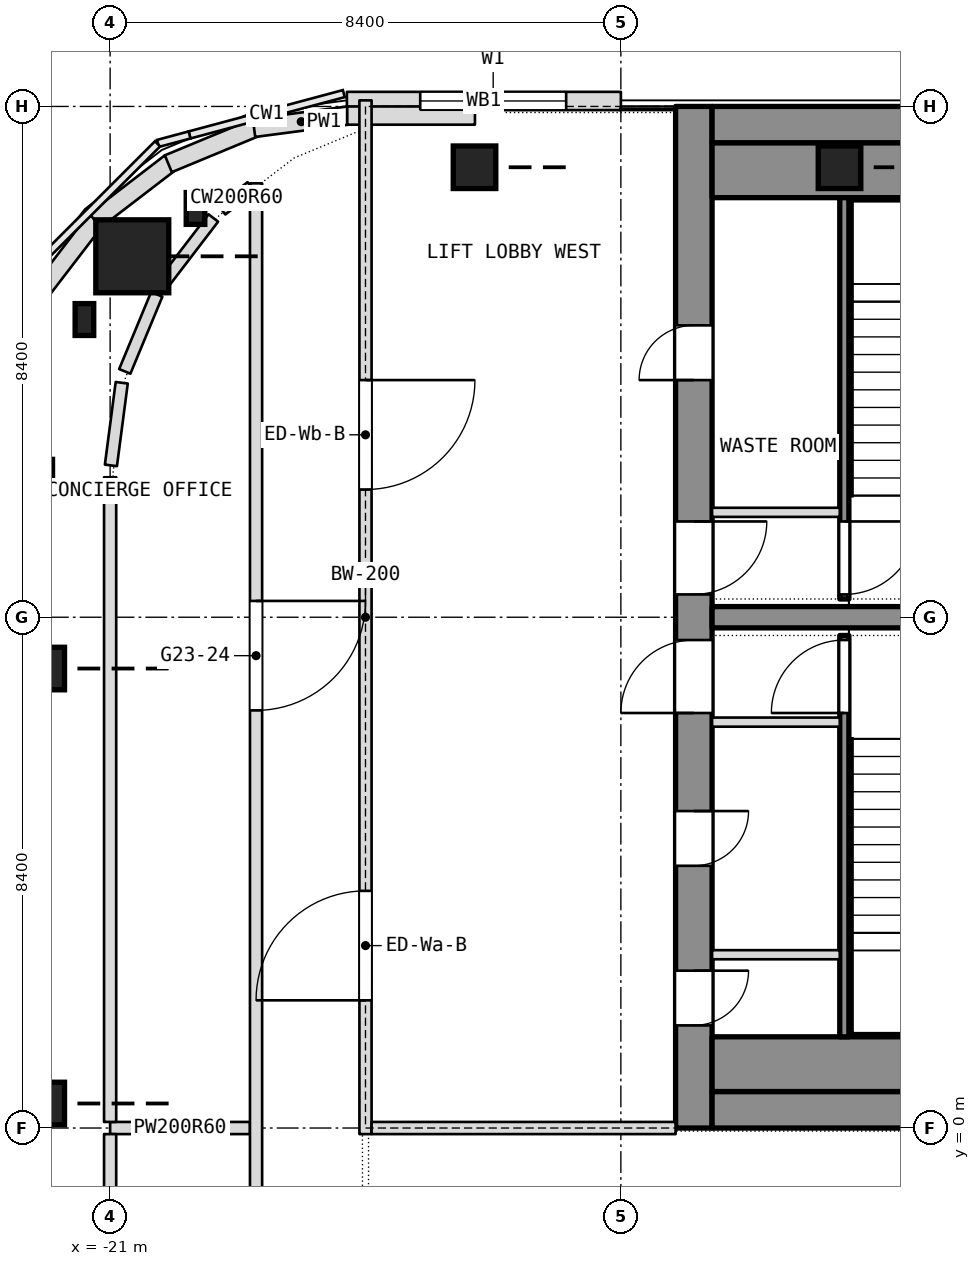
"""IFC4 building model, lengths in metres.
Left out: names, types, materials, properties, quantities, classifications, styles, units other than length and angle.
Written with IfcOpenShell. Run it as: python <this file> out.ifc"""

import sys

from ifc_helpers import new_model, si_unit, direction, frame, frame_2d, origin, origin_2d, place, context, subcontext, project, spatial, rectangle, i_section, extrude, element, fill, save


model = new_model("IFC4")
c1 = context("Model", 3, precision=1e-05, world=origin(), true_north=direction((0.0, 1.0)))
c2 = subcontext(c1, "Body", "Model", "MODEL_VIEW")
j1 = project(units=[si_unit("LENGTHUNIT", "METRE"), si_unit("PLANEANGLEUNIT", "RADIAN")], contexts=[c1])
p1 = place(None, origin())
s1 = spatial("IfcSite", under=j1, at=p1, CompositionType="ELEMENT")
p2 = place(p1, origin())
s2 = spatial("IfcBuilding", under=s1, at=p2, CompositionType="ELEMENT")
p3 = place(p2, frame((0.0, 0.0, 277.7)))
s3 = spatial("IfcBuildingStorey", under=s2, at=p3, CompositionType="ELEMENT", Elevation=277.7)
p4 = place(p3, frame((-11.4, 0.0, 0.0), z_axis=(0.0, 0.0, 1.0), x_axis=(0.0, 1.0, 0.0)))
e1 = element("IfcWall", 1, at=p4, inside=s3, PredefinedType="SHEAR", context=c2, shape_type="SweptSolid", body=[
    extrude(rectangle(XDim=16.8, YDim=0.6, at=frame_2d((8.4, 0.0))), origin(), (0.0, 0.0, 1.0), 3.6),
])
p5 = place(p4, frame((1.688, 0.0, 0.0)))
e2 = element("IfcOpeningElement", 2, at=p5, cuts=e1, PredefinedType="OPENING", context=c2, shape_type="SweptSolid", body=[
    extrude(rectangle(XDim=0.9, YDim=2.1, at=frame_2d((0.45, 1.05))), frame((0.0, 0.3, 0.0), z_axis=(0.0, -1.0, 0.0), x_axis=(1.0, 0.0, 0.0)), (0.0, 0.0, 1.0), 0.6),
])
p6 = place(p4, frame((4.312, 0.0, 0.0)))
e3 = element("IfcOpeningElement", 3, at=p6, cuts=e1, PredefinedType="OPENING", context=c2, shape_type="SweptSolid", body=[
    extrude(rectangle(XDim=0.9, YDim=2.1, at=frame_2d((0.45, 1.05))), frame((0.0, 0.3, 0.0), z_axis=(0.0, -1.0, 0.0), x_axis=(1.0, 0.0, 0.0)), (0.0, 0.0, 1.0), 0.6),
])
p7 = place(p4, frame((6.825, 0.0, 0.0)))
e4 = element("IfcOpeningElement", 4, at=p7, cuts=e1, PredefinedType="OPENING", context=c2, shape_type="SweptSolid", body=[
    extrude(rectangle(XDim=1.2, YDim=2.1, at=frame_2d((0.6, 1.05))), frame((0.0, 0.3, 0.0), z_axis=(0.0, -1.0, 0.0), x_axis=(1.0, 0.0, 0.0)), (0.0, 0.0, 1.0), 0.6),
])
p8 = place(p4, frame((12.3, 0.0, 0.0)))
e5 = element("IfcOpeningElement", 5, at=p8, cuts=e1, PredefinedType="OPENING", context=c2, shape_type="SweptSolid", body=[
    extrude(rectangle(XDim=0.9, YDim=2.1, at=frame_2d((0.45, 1.05))), frame((0.0, 0.3, 0.0), z_axis=(0.0, -1.0, 0.0), x_axis=(1.0, 0.0, 0.0)), (0.0, 0.0, 1.0), 0.6),
])
p9 = place(p4, frame((8.775, 0.0, 0.0)))
e6 = element("IfcOpeningElement", 6, at=p9, cuts=e1, PredefinedType="OPENING", context=c2, shape_type="SweptSolid", body=[
    extrude(rectangle(XDim=1.2, YDim=2.1, at=frame_2d((0.6, 1.05))), frame((0.0, 0.3, 0.0), z_axis=(0.0, -1.0, 0.0), x_axis=(1.0, 0.0, 0.0)), (0.0, 0.0, 1.0), 0.6),
])
for number, where, z_axis, x_axis in (
    (7, (-11.1, 0.3, 0.0), (0.0, 0.0, 1.0), (1.0, 0.0, 0.0)),
    (8, (-11.1, 16.5, 0.0), (0.0, 0.0, 1.0), (1.0, 0.0, 0.0)),
):
    element("IfcWall", number, at=place(p3, frame(where, z_axis=z_axis, x_axis=x_axis)), inside=s3, PredefinedType="SHEAR", context=c2, shape_type="SweptSolid", body=[
        extrude(rectangle(XDim=22.2, YDim=0.6, at=frame_2d((11.1, 0.0))), origin(), (0.0, 0.0, 1.0), 3.6),
    ])
p10 = place(p3, frame((-11.1, 8.4, 0.0), z_axis=(0.0, 0.0, 1.0), x_axis=(1.0, 0.0, 0.0)))
e9 = element("IfcWall", 9, at=p10, inside=s3, PredefinedType="SHEAR", context=c2, shape_type="SweptSolid", body=[
    extrude(rectangle(XDim=6.725, YDim=0.35, at=frame_2d((3.363, 0.0))), origin(), (0.0, 0.0, 1.0), 3.6),
])
for number, where, z_axis, x_axis in (
    (10, (-22.1, 0.403, 0.0), (0.0, 0.0, 1.0), (1.0, 0.0, 0.0)),
    (11, (-22.1, 7.556, 0.0), (0.0, 0.0, 1.0), (1.0, 0.0, 0.0)),
):
    element("IfcColumn", number, at=place(p3, frame(where, z_axis=z_axis, x_axis=x_axis)), inside=s3, PredefinedType="COLUMN", context=c2, shape_type="SweptSolid", body=[
        extrude(i_section(OverallWidth=0.306, OverallDepth=0.524, WebThickness=0.024, FlangeThickness=0.04, FilletRadius=0.027, at=origin_2d()), origin(), (0.0, 0.0, 1.0), 2.94),
    ])
for number, where, z_axis, x_axis in (
    (12, (-22.1, 10.734, -0.26), (0.0, 0.0, 1.0), (1.0, 0.0, 0.0)),
    (13, (-21.423, 13.296, -0.26), (0.0, 0.0, 1.0), (1.0, 0.0, 0.0)),
):
    element("IfcColumn", number, at=place(p3, frame(where, z_axis=z_axis, x_axis=x_axis)), inside=s3, PredefinedType="COLUMN", context=c2, shape_type="SweptSolid", body=[
        extrude(i_section(OverallWidth=0.306, OverallDepth=0.524, WebThickness=0.024, FlangeThickness=0.04, FilletRadius=0.027, at=origin_2d()), origin(), (0.0, 0.0, 1.0), 3.2),
    ])
p11 = place(p3, frame((-20.635, 14.335, 0.0), z_axis=(0.0, 0.0, 1.0), x_axis=(1.0, 0.0, 0.0)))
e14 = element("IfcColumn", 14, at=p11, inside=s3, PredefinedType="COLUMN", context=c2, shape_type="SweptSolid", body=[
    extrude(i_section(OverallWidth=0.306, OverallDepth=0.524, WebThickness=0.024, FlangeThickness=0.04, FilletRadius=0.027, at=origin_2d()), origin(), (0.0, 0.0, 1.0), 2.94),
])
p12 = place(p3, frame((-19.596, 15.123, -0.26), z_axis=(0.0, 0.0, 1.0), x_axis=(1.0, 0.0, 0.0)))
e15 = element("IfcColumn", 15, at=p12, inside=s3, PredefinedType="COLUMN", context=c2, shape_type="SweptSolid", body=[
    extrude(i_section(OverallWidth=0.306, OverallDepth=0.524, WebThickness=0.024, FlangeThickness=0.04, FilletRadius=0.027, at=origin_2d()), origin(), (0.0, 0.0, 1.0), 3.2),
])
p13 = place(p3, frame((-21.0, 0.0, 0.0), z_axis=(0.0, 0.0, 1.0), x_axis=(1.0, 0.0, 0.0)))
e16 = element("IfcWall", 16, at=p13, inside=s3, PredefinedType="PARTITIONING", context=c2, shape_type="SweptSolid", body=[
    extrude(rectangle(XDim=2.3, YDim=0.2, at=frame_2d((1.15, 0.0))), origin(), (0.0, 0.0, 1.0), 2.94),
])
p14 = place(p3, frame((-18.6, -11.8, 0.0), z_axis=(0.0, 0.0, 1.0), x_axis=(0.0, 1.0, 0.0)))
e17 = element("IfcWall", 17, at=p14, inside=s3, PredefinedType="PARTITIONING", context=c2, shape_type="SweptSolid", body=[
    extrude(rectangle(XDim=27.336, YDim=0.2, at=frame_2d((13.668, 0.0))), origin(), (0.0, 0.0, 1.0), 3.34),
])
p15 = place(p14, frame((18.668, 0.0, 0.0)))
e18 = element("IfcOpeningElement", 18, at=p15, cuts=e17, PredefinedType="OPENING", context=c2, shape_type="SweptSolid", body=[
    extrude(rectangle(XDim=1.8, YDim=2.1, at=frame_2d((0.9, 1.05))), frame((0.0, 0.1, 0.0), z_axis=(0.0, -1.0, 0.0), x_axis=(1.0, 0.0, 0.0)), (0.0, 0.0, 1.0), 0.2),
])
p16 = place(p14, frame((5.45, 0.0, 0.0)))
e19 = element("IfcOpeningElement", 19, at=p16, cuts=e17, PredefinedType="OPENING", context=c2, shape_type="SweptSolid", body=[
    extrude(rectangle(XDim=1.0, YDim=2.1, at=frame_2d((0.5, 1.05))), frame((0.0, 0.1, 0.0), z_axis=(0.0, -1.0, 0.0), x_axis=(1.0, 0.0, 0.0)), (0.0, 0.0, 1.0), 0.2),
])
p17 = place(p3, frame((-21.0, -11.6, 0.0), z_axis=(0.0, 0.0, 1.0), x_axis=(0.0, 1.0, 0.0)))
e20 = element("IfcWall", 20, at=p17, inside=s3, PredefinedType="PARTITIONING", context=c2, shape_type="SweptSolid", body=[
    extrude(rectangle(XDim=11.5, YDim=0.2, at=frame_2d((5.75, 0.0))), origin(), (0.0, 0.0, 1.0), 3.34),
])
p18 = place(p3, frame((-21.0, 0.1, 0.0), z_axis=(0.0, 0.0, 1.0), x_axis=(0.0, 1.0, 0.0)))
e21 = element("IfcWall", 21, at=p18, inside=s3, PredefinedType="PARTITIONING", context=c2, shape_type="SweptSolid", body=[
    extrude(rectangle(XDim=10.602, YDim=0.2, at=frame_2d((5.301, 0.0))), origin(), (0.0, 0.0, 1.0), 3.34),
])
p19 = place(p3, frame((-20.987, 10.897, 0.0), z_axis=(0.0, 0.0, 1.0), x_axis=(0.129841713905, 0.991534734303, 0.0)))
e22 = element("IfcWall", 22, at=p19, inside=s3, PredefinedType="PARTITIONING", context=c2, shape_type="SweptSolid", body=[
    extrude(rectangle(XDim=1.371, YDim=0.2, at=frame_2d((0.686, 0.0))), origin(), (0.0, 0.0, 1.0), 3.34),
])
p20 = place(p3, frame((-19.166, 15.103, 0.0), z_axis=(0.0, 0.0, 1.0), x_axis=(0.794663000987, 0.607050833837, 0.0)))
e23 = element("IfcWall", 23, at=p20, inside=s3, PredefinedType="PARTITIONING", context=c2, shape_type="SweptSolid", body=[
    extrude(rectangle(XDim=0.613, YDim=0.2, at=frame_2d((0.306, 0.0))), origin(), (0.0, 0.0, 1.0), 3.34),
])
p21 = place(p3, frame((-20.759, 12.443, 0.0), z_axis=(0.0, 0.0, 1.0), x_axis=(0.383540942064, 0.923523873953, 0.0)))
e24 = element("IfcWall", 24, at=p21, inside=s3, PredefinedType="PARTITIONING", context=c2, shape_type="SweptSolid", body=[
    extrude(rectangle(XDim=1.372, YDim=0.2, at=frame_2d((0.686, 0.0))), origin(), (0.0, 0.0, 1.0), 3.34),
])
p22 = place(p3, frame((-20.136, 13.877, 0.0), z_axis=(0.0, 0.0, 1.0), x_axis=(0.607522804237, 0.794302236137, 0.0)))
e25 = element("IfcWall", 25, at=p22, inside=s3, PredefinedType="PARTITIONING", context=c2, shape_type="SweptSolid", body=[
    extrude(rectangle(XDim=1.371, YDim=0.2, at=frame_2d((0.686, 0.0))), origin(), (0.0, 0.0, 1.0), 3.34),
])
p23 = place(p3, frame((-12.6, 16.89, 0.0), z_axis=(0.0, 0.0, 1.0), x_axis=(-1.0, 0.0, 0.0)))
e26 = element("IfcWall", 26, at=p23, inside=s3, PredefinedType="NOTDEFINED", context=c2, shape_type="SweptSolid", body=[
    extrude(rectangle(XDim=4.506, YDim=0.3, at=frame_2d((2.253, 0.0))), origin(), (0.0, 0.0, 1.0), 3.6),
])
p24 = place(p23, frame((0.9, 0.0, 0.9)))
e27 = element("IfcOpeningElement", 27, at=p24, cuts=e26, PredefinedType="OPENING", context=c2, shape_type="SweptSolid", body=[
    extrude(rectangle(XDim=2.4, YDim=2.1, at=frame_2d((1.2, 1.05))), frame((0.0, 0.15, 0.0), z_axis=(0.0, -1.0, 0.0), x_axis=(1.0, 0.0, 0.0)), (0.0, 0.0, 1.0), 0.3),
])
p25 = place(p3, frame((-22.177, 13.709, 3.6), z_axis=(0.0, 0.0, 1.0), x_axis=(0.608791411033, 0.793330333374, 0.0)))
e28 = element("IfcWall", 28, at=p25, inside=s3, PredefinedType="PARAPET", context=c2, shape_type="SweptSolid", body=[
    extrude(rectangle(XDim=1.566, YDim=0.3, at=frame_2d((0.783, 0.0))), origin(), (0.0, 0.0, 1.0), 1.1),
])
for number, where, z_axis, x_axis in (
    (29, (-21.251, 14.924, 3.6), (0.0, 0.0, 1.0), (0.793, 0.609, 0.0)),
    (30, (-20.042, 15.858, 3.6), (0.0, 0.0, 1.0), (0.924, 0.383, 0.0)),
):
    element("IfcWall", number, at=place(p3, frame(where, z_axis=z_axis, x_axis=x_axis)), inside=s3, PredefinedType="PARAPET", context=c2, shape_type="SweptSolid", body=[
        extrude(rectangle(XDim=1.566, YDim=0.3, at=frame_2d((0.783, 0.0))), origin(), (0.0, 0.0, 1.0), 1.1),
    ])
p26 = place(p3, frame((-18.633, 16.447, 3.6), z_axis=(0.0, 0.0, 1.0), x_axis=(0.991453765022, 0.130458544462, 0.0)))
e31 = element("IfcWall", 31, at=p26, inside=s3, PredefinedType="PARAPET", context=c2, shape_type="SweptSolid", body=[
    extrude(rectangle(XDim=1.566, YDim=0.3, at=frame_2d((0.783, 0.0))), origin(), (0.0, 0.0, 1.0), 1.1),
])
p27 = place(p3, frame((-17.1, 16.65, 3.6), z_axis=(0.0, 0.0, 1.0), x_axis=(1.0, 0.0, 0.0)))
e32 = element("IfcWall", 32, at=p27, inside=s3, PredefinedType="PARAPET", context=c2, shape_type="SweptSolid", body=[
    extrude(rectangle(XDim=2.1, YDim=0.3, at=frame_2d((1.05, 0.0))), origin(), (0.0, 0.0, 1.0), 1.1),
])
for number, where, z_axis, x_axis in (
    (33, (-11.1, 1.05, 0.0), (0.0, 0.0, 1.0), (1.0, 0.0, 0.0)),
    (34, (-11.1, 15.75, 0.0), (0.0, 0.0, 1.0), (1.0, 0.0, 0.0)),
):
    element("IfcWall", number, at=place(p3, frame(where, z_axis=z_axis, x_axis=x_axis)), inside=s3, PredefinedType="PARTITIONING", context=c2, shape_type="SweptSolid", body=[
        extrude(rectangle(XDim=22.2, YDim=0.9, at=frame_2d((11.1, 0.0))), origin(), (0.0, 0.0, 1.0), 3.34),
    ])
p28 = place(p3, frame((-8.925, 1.5, 0.0), z_axis=(0.0, 0.0, 1.0), x_axis=(0.0, 1.0, 0.0)))
e35 = element("IfcWall", 35, at=p28, inside=s3, PredefinedType="SHEAR", context=c2, shape_type="SweptSolid", body=[
    extrude(rectangle(XDim=6.6, YDim=0.15, at=frame_2d((3.3, 0.0))), origin(), (0.0, 0.0, 1.0), 3.34),
])
p29 = place(p28, frame((5.325, 0.0, 0.0)))
e36 = element("IfcOpeningElement", 36, at=p29, cuts=e35, PredefinedType="OPENING", context=c2, shape_type="SweptSolid", body=[
    extrude(rectangle(XDim=1.2, YDim=2.1, at=frame_2d((0.6, 1.05))), frame((0.0, 0.075, 0.0), z_axis=(0.0, -1.0, 0.0), x_axis=(1.0, 0.0, 0.0)), (0.0, 0.0, 1.0), 0.15),
])
for number, where, z_axis, x_axis in (
    (37, (-11.1, 6.675, 0.0), (0.0, 0.0, 1.0), (1.0, 0.0, 0.0)),
    (38, (-11.1, 2.85, 0.0), (0.0, 0.0, 1.0), (1.0, 0.0, 0.0)),
):
    element("IfcWall", number, at=place(p3, frame(where, z_axis=z_axis, x_axis=x_axis)), inside=s3, PredefinedType="PARTITIONING", context=c2, shape_type="SweptSolid", body=[
        extrude(rectangle(XDim=2.1, YDim=0.15, at=frame_2d((1.05, 0.0))), origin(), (0.0, 0.0, 1.0), 3.34),
    ])
p30 = place(p3, frame((-8.925, 8.7, 0.0), z_axis=(0.0, 0.0, 1.0), x_axis=(0.0, 1.0, 0.0)))
e39 = element("IfcWall", 39, at=p30, inside=s3, PredefinedType="SHEAR", context=c2, shape_type="SweptSolid", body=[
    extrude(rectangle(XDim=6.6, YDim=0.15, at=frame_2d((3.3, 0.0))), origin(), (0.0, 0.0, 1.0), 3.34),
])
p31 = place(p30, frame((0.075, 0.0, 0.0)))
e40 = element("IfcOpeningElement", 40, at=p31, cuts=e39, PredefinedType="OPENING", context=c2, shape_type="SweptSolid", body=[
    extrude(rectangle(XDim=1.2, YDim=2.1, at=frame_2d((0.6, 1.05))), frame((0.0, 0.075, 0.0), z_axis=(0.0, -1.0, 0.0), x_axis=(1.0, 0.0, 0.0)), (0.0, 0.0, 1.0), 0.15),
])
p32 = place(p3, frame((-11.1, 10.125, 0.0), z_axis=(0.0, 0.0, 1.0), x_axis=(1.0, 0.0, 0.0)))
e41 = element("IfcWall", 41, at=p32, inside=s3, PredefinedType="PARTITIONING", context=c2, shape_type="SweptSolid", body=[
    extrude(rectangle(XDim=2.1, YDim=0.15, at=frame_2d((1.05, 0.0))), origin(), (0.0, 0.0, 1.0), 3.34),
])
p33 = place(p3, frame((-16.8, -0.1, 0.0), z_axis=(0.0, 0.0, 1.0), x_axis=(0.0, 1.0, 0.0)))
e42 = element("IfcWall", 42, at=p33, inside=s3, PredefinedType="PARTITIONING", context=c2, shape_type="SweptSolid", body=[
    extrude(rectangle(XDim=17.0, YDim=0.2, at=frame_2d((8.5, 0.0))), origin(), (0.0, 0.0, 1.0), 3.34),
])
p34 = place(p33, frame((2.2, 0.0, 0.0)))
e43 = element("IfcOpeningElement", 43, at=p34, cuts=e42, PredefinedType="OPENING", context=c2, shape_type="SweptSolid", body=[
    extrude(rectangle(XDim=1.8, YDim=2.1, at=frame_2d((0.9, 1.05))), frame((0.0, 0.1, 0.0), z_axis=(0.0, -1.0, 0.0), x_axis=(1.0, 0.0, 0.0)), (0.0, 0.0, 1.0), 0.2),
])
p35 = place(p33, frame((10.6, 0.0, 0.0)))
e44 = element("IfcOpeningElement", 44, at=p35, cuts=e42, PredefinedType="OPENING", context=c2, shape_type="SweptSolid", body=[
    extrude(rectangle(XDim=1.8, YDim=2.1, at=frame_2d((0.9, 1.05))), frame((0.0, 0.1, 0.0), z_axis=(0.0, -1.0, 0.0), x_axis=(1.0, 0.0, 0.0)), (0.0, 0.0, 1.0), 0.2),
])
p36 = place(p3, frame((-16.7, 0.0, 0.0), z_axis=(0.0, 0.0, 1.0), x_axis=(1.0, 0.0, 0.0)))
e45 = element("IfcWall", 45, at=p36, inside=s3, PredefinedType="PARTITIONING", context=c2, shape_type="SweptSolid", body=[
    extrude(rectangle(XDim=5.0, YDim=0.2, at=frame_2d((2.5, 0.0))), origin(), (0.0, 0.0, 1.0), 3.0),
])
p37 = place(p15, origin())
e46 = element("IfcDoor", 46, at=p37, inside=s3, OperationType="DOUBLE_DOOR_SINGLE_SWING", PredefinedType="DOOR", context=c2, shape_type="SweptSolid", body=[
    extrude(rectangle(XDim=1.8, YDim=2.1, at=frame_2d((0.9, 1.05))), frame((0.0, 0.025, 0.0), z_axis=(0.0, -1.0, 0.0), x_axis=(1.0, 0.0, 0.0)), (0.0, 0.0, 1.0), 0.05),
])
fill(e18, e46)
p38 = place(p24, origin())
e47 = element("IfcWindow", 47, at=p38, inside=s3, PartitioningType="SINGLE_PANEL", PredefinedType="WINDOW", context=c2, shape_type="SweptSolid", body=[
    extrude(rectangle(XDim=2.4, YDim=2.1, at=frame_2d((1.2, 1.05))), frame((0.0, 0.03, 0.0), z_axis=(0.0, -1.0, 0.0), x_axis=(1.0, 0.0, 0.0)), (0.0, 0.0, 1.0), 0.06),
])
fill(e27, e47)
p39 = place(p5, origin())
e48 = element("IfcDoor", 48, at=p39, inside=s3, OperationType="SINGLE_SWING_LEFT", PredefinedType="DOOR", context=c2, shape_type="SweptSolid", body=[
    extrude(rectangle(XDim=0.9, YDim=2.1, at=frame_2d((0.45, 1.05))), frame((0.0, 0.025, 0.0), z_axis=(0.0, -1.0, 0.0), x_axis=(1.0, 0.0, 0.0)), (0.0, 0.0, 1.0), 0.05),
])
fill(e2, e48)
p40 = place(p6, origin())
e49 = element("IfcDoor", 49, at=p40, inside=s3, OperationType="SINGLE_SWING_LEFT", PredefinedType="DOOR", context=c2, shape_type="SweptSolid", body=[
    extrude(rectangle(XDim=0.9, YDim=2.1, at=frame_2d((0.45, 1.05))), frame((0.0, 0.025, 0.0), z_axis=(0.0, -1.0, 0.0), x_axis=(1.0, 0.0, 0.0)), (0.0, 0.0, 1.0), 0.05),
])
fill(e3, e49)
p41 = place(p7, origin())
e50 = element("IfcDoor", 50, at=p41, inside=s3, OperationType="SINGLE_SWING_LEFT", PredefinedType="DOOR", context=c2, shape_type="SweptSolid", body=[
    extrude(rectangle(XDim=1.2, YDim=2.1, at=frame_2d((0.6, 1.05))), frame((0.0, 0.025, 0.0), z_axis=(0.0, -1.0, 0.0), x_axis=(1.0, 0.0, 0.0)), (0.0, 0.0, 1.0), 0.05),
])
fill(e4, e50)
p42 = place(p29, origin())
e51 = element("IfcDoor", 51, at=p42, inside=s3, OperationType="SINGLE_SWING_LEFT", PredefinedType="DOOR", context=c2, shape_type="SweptSolid", body=[
    extrude(rectangle(XDim=1.2, YDim=2.1, at=frame_2d((0.6, 1.05))), frame((0.0, 0.025, 0.0), z_axis=(0.0, -1.0, 0.0), x_axis=(1.0, 0.0, 0.0)), (0.0, 0.0, 1.0), 0.05),
])
fill(e36, e51)
p43 = place(p8, origin())
e52 = element("IfcDoor", 52, at=p43, inside=s3, OperationType="SINGLE_SWING_LEFT", PredefinedType="DOOR", context=c2, shape_type="SweptSolid", body=[
    extrude(rectangle(XDim=0.9, YDim=2.1, at=frame_2d((0.45, 1.05))), frame((0.0, 0.025, 0.0), z_axis=(0.0, -1.0, 0.0), x_axis=(1.0, 0.0, 0.0)), (0.0, 0.0, 1.0), 0.05),
])
fill(e5, e52)
p44 = place(p9, origin())
e53 = element("IfcDoor", 53, at=p44, inside=s3, OperationType="SINGLE_SWING_LEFT", PredefinedType="DOOR", context=c2, shape_type="SweptSolid", body=[
    extrude(rectangle(XDim=1.2, YDim=2.1, at=frame_2d((0.6, 1.05))), frame((0.0, 0.025, 0.0), z_axis=(0.0, -1.0, 0.0), x_axis=(1.0, 0.0, 0.0)), (0.0, 0.0, 1.0), 0.05),
])
fill(e6, e53)
p45 = place(p31, origin())
e54 = element("IfcDoor", 54, at=p45, inside=s3, OperationType="SINGLE_SWING_LEFT", PredefinedType="DOOR", context=c2, shape_type="SweptSolid", body=[
    extrude(rectangle(XDim=1.2, YDim=2.1, at=frame_2d((0.6, 1.05))), frame((0.0, 0.025, 0.0), z_axis=(0.0, -1.0, 0.0), x_axis=(1.0, 0.0, 0.0)), (0.0, 0.0, 1.0), 0.05),
])
fill(e40, e54)
p46 = place(p34, origin())
e55 = element("IfcDoor", 55, at=p46, inside=s3, OperationType="DOUBLE_DOOR_SINGLE_SWING", PredefinedType="DOOR", context=c2, shape_type="SweptSolid", body=[
    extrude(rectangle(XDim=1.8, YDim=2.1, at=frame_2d((0.9, 1.05))), frame((0.0, 0.025, 0.0), z_axis=(0.0, -1.0, 0.0), x_axis=(1.0, 0.0, 0.0)), (0.0, 0.0, 1.0), 0.05),
])
fill(e43, e55)
p47 = place(p35, origin())
e56 = element("IfcDoor", 56, at=p47, inside=s3, OperationType="DOUBLE_DOOR_SINGLE_SWING", PredefinedType="DOOR", context=c2, shape_type="SweptSolid", body=[
    extrude(rectangle(XDim=1.8, YDim=2.1, at=frame_2d((0.9, 1.05))), frame((0.0, 0.025, 0.0), z_axis=(0.0, -1.0, 0.0), x_axis=(1.0, 0.0, 0.0)), (0.0, 0.0, 1.0), 0.05),
])
fill(e44, e56)
save(model, sys.argv[1])
